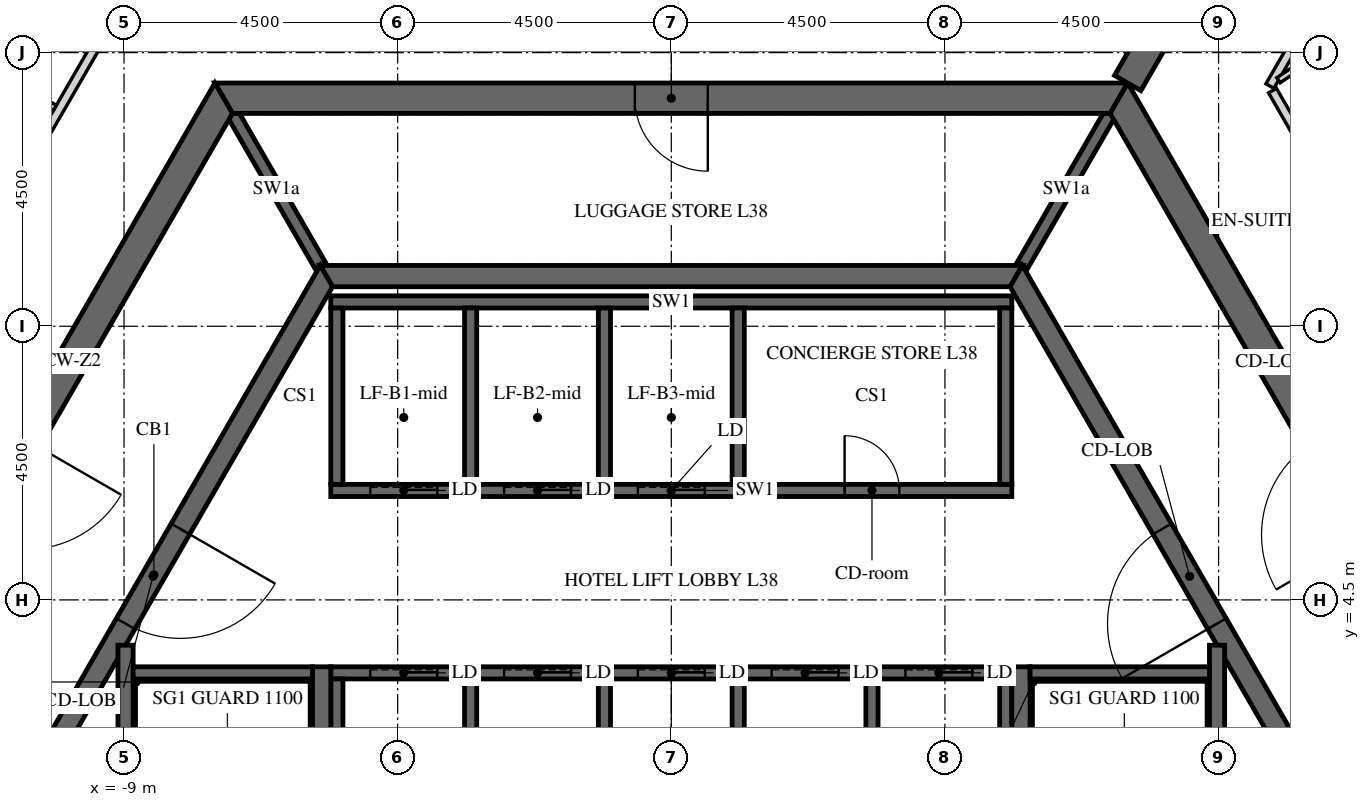
"""IFC4 building model, lengths in metres.
Left out: names, types, materials, properties, quantities, classifications, styles, units other than length and angle.
Written with IfcOpenShell. Run it as: python <this file> out.ifc"""

import sys

from ifc_helpers import new_model, si_unit, direction, frame, frame_2d, origin, place, context, subcontext, project, spatial, polyline, rectangle, outline, extrude, element, fill, save


model = new_model("IFC4")
c1 = context("Model", 3, precision=1e-05, world=origin(), true_north=direction((0.0, 1.0)))
c2 = subcontext(c1, "Body", "Model", "MODEL_VIEW")
j1 = project(units=[si_unit("LENGTHUNIT", "METRE"), si_unit("PLANEANGLEUNIT", "RADIAN")], contexts=[c1])
p1 = place(None, origin())
s1 = spatial("IfcSite", under=j1, at=p1, CompositionType="ELEMENT")
p2 = place(p1, origin())
s2 = spatial("IfcBuilding", under=s1, at=p2, CompositionType="ELEMENT")
p3 = place(p2, frame((0.0, 0.0, 164.4)))
s3 = spatial("IfcBuildingStorey", under=s2, at=p3, CompositionType="ELEMENT", Elevation=164.4)
p4 = place(p3, frame((-7.361, 12.75, -0.15), z_axis=(0.0, 0.0, 1.0), x_axis=(-0.50000571537, -0.866022103989, 0.0)))
e1 = element("IfcWall", 1, at=p4, inside=s3, PredefinedType="SHEAR", context=c2, shape_type="SweptSolid", body=[
    extrude(outline(polyline([(-0.144, -0.25), (14.867, -0.25), (14.578, 0.25), (0.144, 0.25), (-0.144, -0.25)])), origin(), (0.0, 0.0, 1.0), 3.9),
])
p5 = place(p4, frame((6.49, 0.0, 0.15)))
e2 = element("IfcOpeningElement", 2, at=p5, cuts=e1, PredefinedType="OPENING", context=c2, shape_type="SweptSolid", body=[
    extrude(rectangle(XDim=1.8, YDim=2.4, at=frame_2d((0.9, 1.2))), frame((0.0, 0.26, 0.0), z_axis=(0.0, -1.0, 0.0), x_axis=(1.0, 0.0, 0.0)), (0.0, 0.0, 1.0), 0.52),
])
p6 = place(p3, frame((14.722, 0.0, -0.15), z_axis=(0.0, 0.0, 1.0), x_axis=(-0.50000571537, 0.866022103989, 0.0)))
e3 = element("IfcWall", 3, at=p6, inside=s3, PredefinedType="SHEAR", context=c2, shape_type="SweptSolid", body=[
    extrude(outline(polyline([(-0.144, -0.25), (14.867, -0.25), (14.578, 0.25), (0.144, 0.25), (-0.144, -0.25)])), origin(), (0.0, 0.0, 1.0), 3.9),
])
p7 = place(p6, frame((6.432, 0.0, 0.15)))
e4 = element("IfcOpeningElement", 4, at=p7, cuts=e3, PredefinedType="OPENING", context=c2, shape_type="SweptSolid", body=[
    extrude(rectangle(XDim=1.8, YDim=2.4, at=frame_2d((0.9, 1.2))), frame((0.0, 0.26, 0.0), z_axis=(0.0, -1.0, 0.0), x_axis=(1.0, 0.0, 0.0)), (0.0, 0.0, 1.0), 0.52),
])
p8 = place(p3, frame((7.361, 12.75, -0.15), z_axis=(0.0, 0.0, 1.0), x_axis=(-1.0, 0.0, 0.0)))
e5 = element("IfcWall", 5, at=p8, inside=s3, PredefinedType="SHEAR", context=c2, shape_type="SweptSolid", body=[
    extrude(outline(polyline([(-0.144, -0.25), (14.866, -0.25), (14.578, 0.25), (0.144, 0.25), (-0.144, -0.25)])), origin(), (0.0, 0.0, 1.0), 3.9),
])
p9 = place(p8, frame((6.761, 0.0, 0.15)))
e6 = element("IfcOpeningElement", 6, at=p9, cuts=e5, PredefinedType="OPENING", context=c2, shape_type="SweptSolid", body=[
    extrude(rectangle(XDim=1.2, YDim=2.4, at=frame_2d((0.6, 1.2))), frame((0.0, 0.26, 0.0), z_axis=(0.0, -1.0, 0.0), x_axis=(1.0, 0.0, 0.0)), (0.0, 0.0, 1.0), 0.52),
])
p10 = place(p3, frame((7.506, 13.0, -0.15), z_axis=(0.0, 0.0, 1.0), x_axis=(0.499988271576, 0.866032175087, 0.0)))
e7 = element("IfcWall", 7, at=p10, inside=s3, PredefinedType="SHEAR", context=c2, shape_type="SweptSolid", body=[
    extrude(rectangle(XDim=15.424, YDim=0.5, at=frame_2d((7.712, 0.0))), origin(), (0.0, 0.0, 1.0), 3.9),
])
p11 = place(p10, frame((6.812, 0.0, 0.15)))
e8 = element("IfcOpeningElement", 8, at=p11, cuts=e7, PredefinedType="OPENING", context=c2, shape_type="SweptSolid", body=[
    extrude(rectangle(XDim=1.8, YDim=2.4, at=frame_2d((0.9, 1.2))), frame((0.0, 0.26, 0.0), z_axis=(0.0, -1.0, 0.0), x_axis=(1.0, 0.0, 0.0)), (0.0, 0.0, 1.0), 0.52),
])
p12 = place(p3, frame((-5.673, 9.825, -0.15), z_axis=(0.0, 0.0, 1.0), x_axis=(-0.499995046907, -0.866028263435, 0.0)))
e9 = element("IfcWall", 9, at=p12, inside=s3, PredefinedType="SHEAR", context=c2, shape_type="SweptSolid", body=[
    extrude(outline(polyline([(-0.101, -0.175), (11.446, -0.175), (11.244, 0.175), (0.101, 0.175), (-0.101, -0.175)])), origin(), (0.0, 0.0, 1.0), 3.9),
])
p13 = place(p12, frame((4.801, 0.0, 0.15)))
e10 = element("IfcOpeningElement", 10, at=p13, cuts=e9, PredefinedType="OPENING", context=c2, shape_type="SweptSolid", body=[
    extrude(rectangle(XDim=1.8, YDim=2.4, at=frame_2d((0.9, 1.2))), frame((0.0, 0.185, 0.0), z_axis=(0.0, -1.0, 0.0), x_axis=(1.0, 0.0, 0.0)), (0.0, 0.0, 1.0), 0.37),
])
p14 = place(p3, frame((11.345, 0.0, -0.15), z_axis=(0.0, 0.0, 1.0), x_axis=(-0.499995046907, 0.866028263435, 0.0)))
e11 = element("IfcWall", 11, at=p14, inside=s3, PredefinedType="SHEAR", context=c2, shape_type="SweptSolid", body=[
    extrude(outline(polyline([(-0.101, -0.175), (11.446, -0.175), (11.244, 0.175), (0.101, 0.175), (-0.101, -0.175)])), origin(), (0.0, 0.0, 1.0), 3.9),
])
p15 = place(p14, frame((4.744, 0.0, 0.15)))
e12 = element("IfcOpeningElement", 12, at=p15, cuts=e11, PredefinedType="OPENING", context=c2, shape_type="SweptSolid", body=[
    extrude(rectangle(XDim=1.8, YDim=2.4, at=frame_2d((0.9, 1.2))), frame((0.0, 0.185, 0.0), z_axis=(0.0, -1.0, 0.0), x_axis=(1.0, 0.0, 0.0)), (0.0, 0.0, 1.0), 0.37),
])
p16 = place(p3, frame((5.673, 9.825, -0.15), z_axis=(0.0, 0.0, 1.0), x_axis=(-1.0, 0.0, 0.0)))
e13 = element("IfcWall", 13, at=p16, inside=s3, PredefinedType="SHEAR", context=c2, shape_type="SweptSolid", body=[
    extrude(outline(polyline([(-0.101, -0.175), (11.446, -0.175), (11.244, 0.175), (0.101, 0.175), (-0.101, -0.175)])), origin(), (0.0, 0.0, 1.0), 3.9),
])
p17 = place(p3, frame((-5.6, 6.3, -0.25), z_axis=(0.0, 0.0, 1.0), x_axis=(1.0, 0.0, 0.0)))
e14 = element("IfcWall", 14, at=p17, inside=s3, PredefinedType="SHEAR", context=c2, shape_type="SweptSolid", body=[
    extrude(rectangle(XDim=11.2, YDim=0.2, at=frame_2d((5.6, 0.0))), origin(), (0.0, 0.0, 1.0), 3.9),
])
p18 = place(p17, frame((8.45, 0.0, 0.25)))
e15 = element("IfcOpeningElement", 15, at=p18, cuts=e14, PredefinedType="OPENING", context=c2, shape_type="SweptSolid", body=[
    extrude(rectangle(XDim=0.9, YDim=2.1, at=frame_2d((0.45, 1.05))), frame((0.0, 0.11, 0.0), z_axis=(0.0, -1.0, 0.0), x_axis=(1.0, 0.0, 0.0)), (0.0, 0.0, 1.0), 0.22),
])
p19 = place(p17, frame((0.65, 0.0, 0.25)))
e16 = element("IfcOpeningElement", 16, at=p19, cuts=e14, PredefinedType="OPENING", context=c2, shape_type="SweptSolid", body=[
    extrude(rectangle(XDim=1.1, YDim=2.1, at=frame_2d((0.55, 1.05))), frame((0.0, 0.11, 0.0), z_axis=(0.0, -1.0, 0.0), x_axis=(1.0, 0.0, 0.0)), (0.0, 0.0, 1.0), 0.22),
])
p20 = place(p17, frame((2.85, 0.0, 0.25)))
e17 = element("IfcOpeningElement", 17, at=p20, cuts=e14, PredefinedType="OPENING", context=c2, shape_type="SweptSolid", body=[
    extrude(rectangle(XDim=1.1, YDim=2.1, at=frame_2d((0.55, 1.05))), frame((0.0, 0.11, 0.0), z_axis=(0.0, -1.0, 0.0), x_axis=(1.0, 0.0, 0.0)), (0.0, 0.0, 1.0), 0.22),
])
p21 = place(p17, frame((5.05, 0.0, 0.25)))
e18 = element("IfcOpeningElement", 18, at=p21, cuts=e14, PredefinedType="OPENING", context=c2, shape_type="SweptSolid", body=[
    extrude(rectangle(XDim=1.1, YDim=2.1, at=frame_2d((0.55, 1.05))), frame((0.0, 0.11, 0.0), z_axis=(0.0, -1.0, 0.0), x_axis=(1.0, 0.0, 0.0)), (0.0, 0.0, 1.0), 0.22),
])
p22 = place(p3, frame((-5.6, 9.4, -0.25), z_axis=(0.0, 0.0, 1.0), x_axis=(1.0, 0.0, 0.0)))
e19 = element("IfcWall", 19, at=p22, inside=s3, PredefinedType="SHEAR", context=c2, shape_type="SweptSolid", body=[
    extrude(rectangle(XDim=11.2, YDim=0.2, at=frame_2d((5.6, 0.0))), origin(), (0.0, 0.0, 1.0), 3.9),
])
for number, where, z_axis, x_axis in (
    (20, (-5.5, 6.4, -0.25), (0.0, 0.0, 1.0), (0.0, 1.0, 0.0)),
    (21, (-3.3, 6.4, -0.25), (0.0, 0.0, 1.0), (0.0, 1.0, 0.0)),
    (22, (-1.1, 6.4, -0.25), (0.0, 0.0, 1.0), (0.0, 1.0, 0.0)),
    (23, (1.1, 6.4, -0.25), (0.0, 0.0, 1.0), (0.0, 1.0, 0.0)),
    (24, (5.5, 6.4, -0.25), (0.0, 0.0, 1.0), (0.0, 1.0, 0.0)),
):
    element("IfcWall", number, at=place(p3, frame(where, z_axis=z_axis, x_axis=x_axis)), inside=s3, PredefinedType="SHEAR", context=c2, shape_type="SweptSolid", body=[
        extrude(rectangle(XDim=2.9, YDim=0.2, at=frame_2d((1.45, 0.0))), origin(), (0.0, 0.0, 1.0), 3.9),
    ])
p23 = place(p3, frame((-5.6, 3.3, -0.25), z_axis=(0.0, 0.0, 1.0), x_axis=(1.0, 0.0, 0.0)))
e25 = element("IfcWall", 25, at=p23, inside=s3, PredefinedType="SHEAR", context=c2, shape_type="SweptSolid", body=[
    extrude(rectangle(XDim=11.2, YDim=0.2, at=frame_2d((5.6, 0.0))), origin(), (0.0, 0.0, 1.0), 3.9),
])
p24 = place(p23, frame((0.65, 0.0, 0.25)))
e26 = element("IfcOpeningElement", 26, at=p24, cuts=e25, PredefinedType="OPENING", context=c2, shape_type="SweptSolid", body=[
    extrude(rectangle(XDim=1.1, YDim=2.1, at=frame_2d((0.55, 1.05))), frame((0.0, 0.11, 0.0), z_axis=(0.0, -1.0, 0.0), x_axis=(1.0, 0.0, 0.0)), (0.0, 0.0, 1.0), 0.22),
])
p25 = place(p23, frame((2.85, 0.0, 0.25)))
e27 = element("IfcOpeningElement", 27, at=p25, cuts=e25, PredefinedType="OPENING", context=c2, shape_type="SweptSolid", body=[
    extrude(rectangle(XDim=1.1, YDim=2.1, at=frame_2d((0.55, 1.05))), frame((0.0, 0.11, 0.0), z_axis=(0.0, -1.0, 0.0), x_axis=(1.0, 0.0, 0.0)), (0.0, 0.0, 1.0), 0.22),
])
p26 = place(p23, frame((5.05, 0.0, 0.25)))
e28 = element("IfcOpeningElement", 28, at=p26, cuts=e25, PredefinedType="OPENING", context=c2, shape_type="SweptSolid", body=[
    extrude(rectangle(XDim=1.1, YDim=2.1, at=frame_2d((0.55, 1.05))), frame((0.0, 0.11, 0.0), z_axis=(0.0, -1.0, 0.0), x_axis=(1.0, 0.0, 0.0)), (0.0, 0.0, 1.0), 0.22),
])
p27 = place(p23, frame((7.25, 0.0, 0.25)))
e29 = element("IfcOpeningElement", 29, at=p27, cuts=e25, PredefinedType="OPENING", context=c2, shape_type="SweptSolid", body=[
    extrude(rectangle(XDim=1.1, YDim=2.1, at=frame_2d((0.55, 1.05))), frame((0.0, 0.11, 0.0), z_axis=(0.0, -1.0, 0.0), x_axis=(1.0, 0.0, 0.0)), (0.0, 0.0, 1.0), 0.22),
])
p28 = place(p23, frame((9.45, 0.0, 0.25)))
e30 = element("IfcOpeningElement", 30, at=p28, cuts=e25, PredefinedType="OPENING", context=c2, shape_type="SweptSolid", body=[
    extrude(rectangle(XDim=1.1, YDim=2.1, at=frame_2d((0.55, 1.05))), frame((0.0, 0.11, 0.0), z_axis=(0.0, -1.0, 0.0), x_axis=(1.0, 0.0, 0.0)), (0.0, 0.0, 1.0), 0.22),
])
for number, where, z_axis, x_axis in (
    (31, (-5.5, 0.1, -0.25), (0.0, 0.0, 1.0), (0.0, 1.0, 0.0)),
    (32, (-3.3, 0.1, -0.25), (0.0, 0.0, 1.0), (0.0, 1.0, 0.0)),
    (33, (-1.1, 0.1, -0.25), (0.0, 0.0, 1.0), (0.0, 1.0, 0.0)),
    (34, (1.1, 0.1, -0.25), (0.0, 0.0, 1.0), (0.0, 1.0, 0.0)),
    (35, (3.3, 0.1, -0.25), (0.0, 0.0, 1.0), (0.0, 1.0, 0.0)),
    (36, (5.5, 0.1, -0.25), (0.0, 0.0, 1.0), (0.0, 1.0, 0.0)),
):
    element("IfcWall", number, at=place(p3, frame(where, z_axis=z_axis, x_axis=x_axis)), inside=s3, PredefinedType="SHEAR", context=c2, shape_type="SweptSolid", body=[
        extrude(rectangle(XDim=3.1, YDim=0.2, at=frame_2d((1.55, 0.0))), origin(), (0.0, 0.0, 1.0), 3.9),
    ])
for number, where, z_axis, x_axis in (
    (37, (5.773, 10.0, -0.15), (0.0, 0.0, 1.0), (0.5, 0.866, 0.0)),
    (38, (-5.773, 10.0, -0.15), (0.0, 0.0, 1.0), (-0.5, 0.866, 0.0)),
):
    element("IfcWall", number, at=place(p3, frame(where, z_axis=z_axis, x_axis=x_axis)), inside=s3, PredefinedType="SHEAR", context=c2, shape_type="SweptSolid", body=[
        extrude(rectangle(XDim=2.887, YDim=0.2, at=frame_2d((1.443, 0.0))), origin(), (0.0, 0.0, 1.0), 3.9),
    ])
p29 = place(p3, frame((5.75, -3.4, -0.25), z_axis=(0.0, 0.0, 1.0), x_axis=(0.0, 1.0, 0.0)))
e39 = element("IfcWall", 39, at=p29, inside=s3, PredefinedType="SHEAR", context=c2, shape_type="SweptSolid", body=[
    extrude(rectangle(XDim=6.8, YDim=0.3, at=frame_2d((3.4, 0.0))), origin(), (0.0, 0.0, 1.0), 3.9),
])
p30 = place(p3, frame((8.975, -3.755, -0.25), z_axis=(0.0, 0.0, 1.0), x_axis=(0.0, 1.0, 0.0)))
e40 = element("IfcWall", 40, at=p30, inside=s3, PredefinedType="SHEAR", context=c2, shape_type="SweptSolid", body=[
    extrude(rectangle(XDim=7.51, YDim=0.25, at=frame_2d((3.755, 0.0))), origin(), (0.0, 0.0, 1.0), 3.9),
])
p31 = place(p3, frame((5.9, 3.3, -0.25), z_axis=(0.0, 0.0, 1.0), x_axis=(1.0, 0.0, 0.0)))
e41 = element("IfcWall", 41, at=p31, inside=s3, PredefinedType="SHEAR", context=c2, shape_type="SweptSolid", body=[
    extrude(rectangle(XDim=2.95, YDim=0.2, at=frame_2d((1.475, 0.0))), origin(), (0.0, 0.0, 1.0), 3.9),
])
p32 = place(p3, frame((-5.75, -3.4, -0.25), z_axis=(0.0, 0.0, 1.0), x_axis=(0.0, 1.0, 0.0)))
e42 = element("IfcWall", 42, at=p32, inside=s3, PredefinedType="SHEAR", context=c2, shape_type="SweptSolid", body=[
    extrude(rectangle(XDim=6.8, YDim=0.3, at=frame_2d((3.4, 0.0))), origin(), (0.0, 0.0, 1.0), 3.9),
])
p33 = place(p3, frame((-8.975, -3.755, -0.25), z_axis=(0.0, 0.0, 1.0), x_axis=(0.0, 1.0, 0.0)))
e43 = element("IfcWall", 43, at=p33, inside=s3, PredefinedType="SHEAR", context=c2, shape_type="SweptSolid", body=[
    extrude(rectangle(XDim=7.51, YDim=0.25, at=frame_2d((3.755, 0.0))), origin(), (0.0, 0.0, 1.0), 3.9),
])
p34 = place(p3, frame((-8.85, 3.3, -0.25), z_axis=(0.0, 0.0, 1.0), x_axis=(1.0, 0.0, 0.0)))
e44 = element("IfcWall", 44, at=p34, inside=s3, PredefinedType="SHEAR", context=c2, shape_type="SweptSolid", body=[
    extrude(rectangle(XDim=2.95, YDim=0.2, at=frame_2d((1.475, 0.0))), origin(), (0.0, 0.0, 1.0), 3.9),
])
p35 = place(p3, frame((-8.704, 14.925, 0.0), z_axis=(0.0, 0.0, 1.0), x_axis=(-0.499988884089, -0.866031821464, 0.0)))
e45 = element("IfcWall", 45, at=p35, inside=s3, PredefinedType="PARTITIONING", context=c2, shape_type="SweptSolid", body=[
    extrude(rectangle(XDim=14.78, YDim=0.15, at=frame_2d((7.39, 0.0))), origin(), (0.0, 0.0, 1.0), 2.988),
])
p36 = place(p35, frame((7.281, 0.0, 0.0)))
e46 = element("IfcOpeningElement", 46, at=p36, cuts=e45, PredefinedType="OPENING", context=c2, shape_type="SweptSolid", body=[
    extrude(rectangle(XDim=1.0, YDim=2.1, at=frame_2d((0.5, 1.05))), frame((0.0, 0.085, 0.0), z_axis=(0.0, -1.0, 0.0), x_axis=(1.0, 0.0, 0.0)), (0.0, 0.0, 1.0), 0.17),
])
p37 = place(p3, frame((17.277, 0.075, 0.0), z_axis=(0.0, 0.0, 1.0), x_axis=(-0.499988884089, 0.866031821464, 0.0)))
e47 = element("IfcWall", 47, at=p37, inside=s3, PredefinedType="PARTITIONING", context=c2, shape_type="SweptSolid", body=[
    extrude(rectangle(XDim=14.78, YDim=0.15, at=frame_2d((7.39, 0.0))), origin(), (0.0, 0.0, 1.0), 2.988),
])
p38 = place(p37, frame((4.393, 0.0, 0.0)))
e48 = element("IfcOpeningElement", 48, at=p38, cuts=e47, PredefinedType="OPENING", context=c2, shape_type="SweptSolid", body=[
    extrude(rectangle(XDim=1.0, YDim=2.1, at=frame_2d((0.5, 1.05))), frame((0.0, 0.085, 0.0), z_axis=(0.0, -1.0, 0.0), x_axis=(1.0, 0.0, 0.0)), (0.0, 0.0, 1.0), 0.17),
])
p39 = place(p37, frame((8.885, 0.0, 0.0)))
e49 = element("IfcOpeningElement", 49, at=p39, cuts=e47, PredefinedType="OPENING", context=c2, shape_type="SweptSolid", body=[
    extrude(rectangle(XDim=1.0, YDim=2.1, at=frame_2d((0.5, 1.05))), frame((0.0, 0.085, 0.0), z_axis=(0.0, -1.0, 0.0), x_axis=(1.0, 0.0, 0.0)), (0.0, 0.0, 1.0), 0.17),
])
p40 = place(p3, frame((9.844, 12.95, 0.0), z_axis=(0.0, 0.0, 1.0), x_axis=(0.500003831281, 0.866023191782, 0.0)))
e50 = element("IfcWall", 50, at=p40, inside=s3, PredefinedType="PARTITIONING", context=c2, shape_type="SweptSolid", body=[
    extrude(rectangle(XDim=7.786, YDim=0.15, at=frame_2d((3.893, 0.0))), origin(), (0.0, 0.0, 1.0), 2.988),
])
p41 = place(p3, frame((-10.138, 12.591, 0.0), z_axis=(0.0, 0.0, 1.0), x_axis=(-0.866025730634, 0.499999433879, 0.0)))
e51 = element("IfcWall", 51, at=p41, inside=s3, PredefinedType="PARTITIONING", context=c2, shape_type="SweptSolid", body=[
    extrude(rectangle(XDim=2.925, YDim=0.1, at=frame_2d((1.462, 0.0))), origin(), (0.0, 0.0, 1.0), 2.988),
])
p42 = place(p3, frame((9.986, 13.046, 0.0), z_axis=(0.0, 0.0, 1.0), x_axis=(0.829041811541, 0.559186618865, 0.0)))
e52 = element("IfcWall", 52, at=p42, inside=s3, PredefinedType="PARTITIONING", context=c2, shape_type="SweptSolid", body=[
    extrude(rectangle(XDim=2.344, YDim=0.1, at=frame_2d((1.172, 0.0))), origin(), (0.0, 0.0, 1.0), 2.988),
])
p43 = place(p9, origin())
e53 = element("IfcDoor", 53, at=p43, inside=s3, OperationType="SINGLE_SWING_LEFT", PredefinedType="DOOR", context=c2, shape_type="SweptSolid", body=[
    extrude(rectangle(XDim=1.2, YDim=2.4, at=frame_2d((0.6, 1.2))), frame((0.0, 0.025, 0.0), z_axis=(0.0, -1.0, 0.0), x_axis=(1.0, 0.0, 0.0)), (0.0, 0.0, 1.0), 0.05),
])
fill(e6, e53)
p44 = place(p13, origin())
e54 = element("IfcDoor", 54, at=p44, inside=s3, OperationType="DOUBLE_DOOR_SINGLE_SWING", PredefinedType="DOOR", context=c2, shape_type="SweptSolid", body=[
    extrude(rectangle(XDim=1.8, YDim=2.4, at=frame_2d((0.9, 1.2))), frame((0.0, 0.025, 0.0), z_axis=(0.0, -1.0, 0.0), x_axis=(1.0, 0.0, 0.0)), (0.0, 0.0, 1.0), 0.05),
])
fill(e10, e54)
p45 = place(p15, origin())
e55 = element("IfcDoor", 55, at=p45, inside=s3, OperationType="DOUBLE_DOOR_SINGLE_SWING", PredefinedType="DOOR", context=c2, shape_type="SweptSolid", body=[
    extrude(rectangle(XDim=1.8, YDim=2.4, at=frame_2d((0.9, 1.2))), frame((0.0, 0.025, 0.0), z_axis=(0.0, -1.0, 0.0), x_axis=(1.0, 0.0, 0.0)), (0.0, 0.0, 1.0), 0.05),
])
fill(e12, e55)
p46 = place(p18, origin())
e56 = element("IfcDoor", 56, at=p46, inside=s3, OperationType="SINGLE_SWING_LEFT", PredefinedType="DOOR", context=c2, shape_type="SweptSolid", body=[
    extrude(rectangle(XDim=0.9, YDim=2.1, at=frame_2d((0.45, 1.05))), frame((0.0, 0.025, 0.0), z_axis=(0.0, -1.0, 0.0), x_axis=(1.0, 0.0, 0.0)), (0.0, 0.0, 1.0), 0.05),
])
fill(e15, e56)
p47 = place(p19, origin())
e57 = element("IfcDoor", 57, at=p47, inside=s3, OperationType="SLIDING_TO_LEFT", PredefinedType="DOOR", context=c2, shape_type="SweptSolid", body=[
    extrude(rectangle(XDim=1.1, YDim=2.1, at=frame_2d((0.55, 1.05))), frame((0.0, 0.025, 0.0), z_axis=(0.0, -1.0, 0.0), x_axis=(1.0, 0.0, 0.0)), (0.0, 0.0, 1.0), 0.05),
])
fill(e16, e57)
p48 = place(p20, origin())
e58 = element("IfcDoor", 58, at=p48, inside=s3, OperationType="SLIDING_TO_LEFT", PredefinedType="DOOR", context=c2, shape_type="SweptSolid", body=[
    extrude(rectangle(XDim=1.1, YDim=2.1, at=frame_2d((0.55, 1.05))), frame((0.0, 0.025, 0.0), z_axis=(0.0, -1.0, 0.0), x_axis=(1.0, 0.0, 0.0)), (0.0, 0.0, 1.0), 0.05),
])
fill(e17, e58)
p49 = place(p21, origin())
e59 = element("IfcDoor", 59, at=p49, inside=s3, OperationType="SLIDING_TO_LEFT", PredefinedType="DOOR", context=c2, shape_type="SweptSolid", body=[
    extrude(rectangle(XDim=1.1, YDim=2.1, at=frame_2d((0.55, 1.05))), frame((0.0, 0.025, 0.0), z_axis=(0.0, -1.0, 0.0), x_axis=(1.0, 0.0, 0.0)), (0.0, 0.0, 1.0), 0.05),
])
fill(e18, e59)
p50 = place(p24, origin())
e60 = element("IfcDoor", 60, at=p50, inside=s3, OperationType="SLIDING_TO_LEFT", PredefinedType="DOOR", context=c2, shape_type="SweptSolid", body=[
    extrude(rectangle(XDim=1.1, YDim=2.1, at=frame_2d((0.55, 1.05))), frame((0.0, 0.025, 0.0), z_axis=(0.0, -1.0, 0.0), x_axis=(1.0, 0.0, 0.0)), (0.0, 0.0, 1.0), 0.05),
])
fill(e26, e60)
p51 = place(p25, origin())
e61 = element("IfcDoor", 61, at=p51, inside=s3, OperationType="SLIDING_TO_LEFT", PredefinedType="DOOR", context=c2, shape_type="SweptSolid", body=[
    extrude(rectangle(XDim=1.1, YDim=2.1, at=frame_2d((0.55, 1.05))), frame((0.0, 0.025, 0.0), z_axis=(0.0, -1.0, 0.0), x_axis=(1.0, 0.0, 0.0)), (0.0, 0.0, 1.0), 0.05),
])
fill(e27, e61)
p52 = place(p26, origin())
e62 = element("IfcDoor", 62, at=p52, inside=s3, OperationType="SLIDING_TO_LEFT", PredefinedType="DOOR", context=c2, shape_type="SweptSolid", body=[
    extrude(rectangle(XDim=1.1, YDim=2.1, at=frame_2d((0.55, 1.05))), frame((0.0, 0.025, 0.0), z_axis=(0.0, -1.0, 0.0), x_axis=(1.0, 0.0, 0.0)), (0.0, 0.0, 1.0), 0.05),
])
fill(e28, e62)
p53 = place(p27, origin())
e63 = element("IfcDoor", 63, at=p53, inside=s3, OperationType="SLIDING_TO_LEFT", PredefinedType="DOOR", context=c2, shape_type="SweptSolid", body=[
    extrude(rectangle(XDim=1.1, YDim=2.1, at=frame_2d((0.55, 1.05))), frame((0.0, 0.025, 0.0), z_axis=(0.0, -1.0, 0.0), x_axis=(1.0, 0.0, 0.0)), (0.0, 0.0, 1.0), 0.05),
])
fill(e29, e63)
p54 = place(p28, origin())
e64 = element("IfcDoor", 64, at=p54, inside=s3, OperationType="SLIDING_TO_LEFT", PredefinedType="DOOR", context=c2, shape_type="SweptSolid", body=[
    extrude(rectangle(XDim=1.1, YDim=2.1, at=frame_2d((0.55, 1.05))), frame((0.0, 0.025, 0.0), z_axis=(0.0, -1.0, 0.0), x_axis=(1.0, 0.0, 0.0)), (0.0, 0.0, 1.0), 0.05),
])
fill(e30, e64)
save(model, sys.argv[1])
